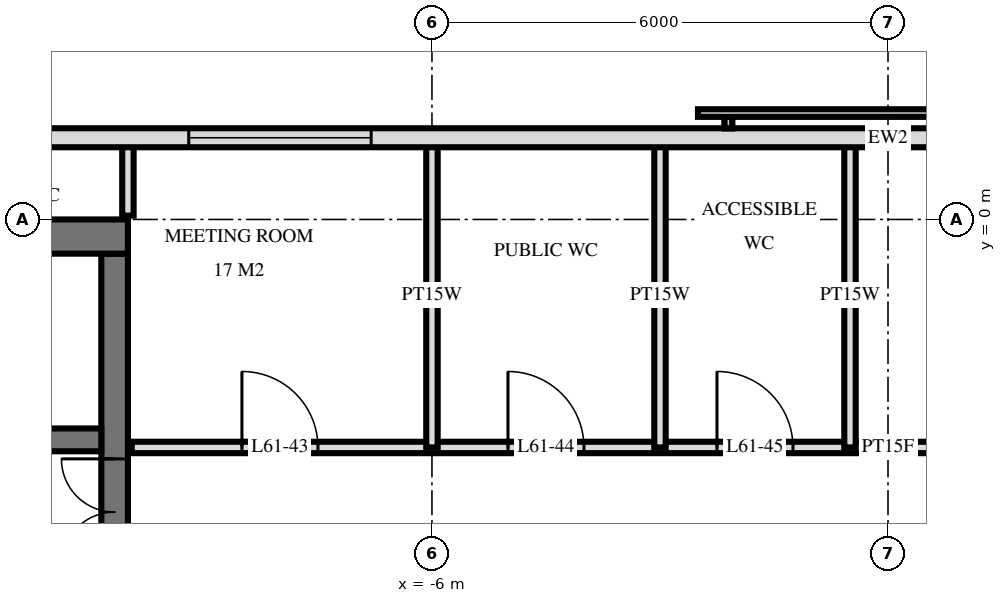
"""IFC4 building model, lengths in metres.
Left out: names, types, materials, properties, quantities, classifications, styles, units other than length and angle.
Written with IfcOpenShell. Run it as: python <this file> out.ifc"""

import sys

from ifc_helpers import new_model, si_unit, direction, frame, frame_2d, origin, place, context, subcontext, project, spatial, rectangle, extrude, element, fill, save


model = new_model("IFC4")
c1 = context("Model", 3, precision=1e-05, world=origin(), true_north=direction((0.0, 1.0)))
c2 = subcontext(c1, "Body", "Model", "MODEL_VIEW")
j1 = project(units=[si_unit("LENGTHUNIT", "METRE"), si_unit("PLANEANGLEUNIT", "RADIAN")], contexts=[c1])
p1 = place(None, origin())
s1 = spatial("IfcSite", under=j1, at=p1, CompositionType="ELEMENT")
p2 = place(p1, origin())
s2 = spatial("IfcBuilding", under=s1, at=p2, CompositionType="ELEMENT")
p3 = place(p2, frame((0.0, 0.0, 232.6)))
s3 = spatial("IfcBuildingStorey", under=s2, at=p3, CompositionType="ELEMENT", Elevation=232.6)
p4 = place(p3, frame((-24.5, -0.225, 0.0), z_axis=(0.0, 0.0, 1.0), x_axis=(1.0, 0.0, 0.0)))
e1 = element("IfcWall", 1, at=p4, inside=s3, PredefinedType="SHEAR", context=c2, shape_type="SweptSolid", body=[
    extrude(rectangle(XDim=14.5, YDim=0.45, at=frame_2d((7.25, 0.0))), origin(), (0.0, 0.0, 1.0), 3.5),
])
p5 = place(p3, frame((-10.175, -14.55, 0.0), z_axis=(0.0, 0.0, 1.0), x_axis=(0.0, 1.0, 0.0)))
e2 = element("IfcWall", 2, at=p5, inside=s3, PredefinedType="SHEAR", context=c2, shape_type="SweptSolid", body=[
    extrude(rectangle(XDim=14.1, YDim=0.35, at=frame_2d((7.05, 0.0))), origin(), (0.0, 0.0, 1.0), 3.5),
])
p6 = place(p5, frame((8.4, 0.0, 0.0)))
e3 = element("IfcOpeningElement", 3, at=p6, cuts=e2, PredefinedType="OPENING", context=c2, shape_type="SweptSolid", body=[
    extrude(rectangle(XDim=1.4, YDim=2.4, at=frame_2d((0.7, 1.2))), frame((0.0, 0.185, 0.0), z_axis=(0.0, -1.0, 0.0), x_axis=(1.0, 0.0, 0.0)), (0.0, 0.0, 1.0), 0.37),
])
p7 = place(p5, frame((10.0, 0.0, 0.0)))
e4 = element("IfcOpeningElement", 4, at=p7, cuts=e2, PredefinedType="OPENING", context=c2, shape_type="SweptSolid", body=[
    extrude(rectangle(XDim=1.4, YDim=2.4, at=frame_2d((0.7, 1.2))), frame((0.0, 0.185, 0.0), z_axis=(0.0, -1.0, 0.0), x_axis=(1.0, 0.0, 0.0)), (0.0, 0.0, 1.0), 0.37),
])
p8 = place(p5, frame((4.0, 0.0, 0.0)))
e5 = element("IfcOpeningElement", 5, at=p8, cuts=e2, PredefinedType="OPENING", context=c2, shape_type="SweptSolid", body=[
    extrude(rectangle(XDim=1.2, YDim=2.1, at=frame_2d((0.6, 1.05))), frame((0.0, 0.185, 0.0), z_axis=(0.0, -1.0, 0.0), x_axis=(1.0, 0.0, 0.0)), (0.0, 0.0, 1.0), 0.37),
])
p9 = place(p3, frame((-24.05, -2.9, 0.0), z_axis=(0.0, 0.0, 1.0), x_axis=(1.0, 0.0, 0.0)))
e6 = element("IfcWall", 6, at=p9, inside=s3, PredefinedType="SHEAR", context=c2, shape_type="SweptSolid", body=[
    extrude(rectangle(XDim=13.7, YDim=0.3, at=frame_2d((6.85, 0.0))), origin(), (0.0, 0.0, 1.0), 3.5),
])
p10 = place(p9, frame((0.55, 0.0, 0.0)))
e7 = element("IfcOpeningElement", 7, at=p10, cuts=e6, PredefinedType="OPENING", context=c2, shape_type="SweptSolid", body=[
    extrude(rectangle(XDim=1.1, YDim=2.1, at=frame_2d((0.55, 1.05))), frame((0.0, 0.16, 0.0), z_axis=(0.0, -1.0, 0.0), x_axis=(1.0, 0.0, 0.0)), (0.0, 0.0, 1.0), 0.32),
])
p11 = place(p9, frame((5.9, 0.0, 0.0)))
e8 = element("IfcOpeningElement", 8, at=p11, cuts=e6, PredefinedType="OPENING", context=c2, shape_type="SweptSolid", body=[
    extrude(rectangle(XDim=0.9, YDim=2.1, at=frame_2d((0.45, 1.05))), frame((0.0, 0.16, 0.0), z_axis=(0.0, -1.0, 0.0), x_axis=(1.0, 0.0, 0.0)), (0.0, 0.0, 1.0), 0.32),
])
p12 = place(p9, frame((11.85, 0.0, 0.0)))
e9 = element("IfcOpeningElement", 9, at=p12, cuts=e6, PredefinedType="OPENING", context=c2, shape_type="SweptSolid", body=[
    extrude(rectangle(XDim=1.0, YDim=2.1, at=frame_2d((0.5, 1.05))), frame((0.0, 0.16, 0.0), z_axis=(0.0, -1.0, 0.0), x_axis=(1.0, 0.0, 0.0)), (0.0, 0.0, 1.0), 0.32),
])
p13 = place(p9, frame((8.85, 0.0, 0.0)))
e10 = element("IfcOpeningElement", 10, at=p13, cuts=e6, PredefinedType="OPENING", context=c2, shape_type="SweptSolid", body=[
    extrude(rectangle(XDim=1.0, YDim=2.1, at=frame_2d((0.5, 1.05))), frame((0.0, 0.16, 0.0), z_axis=(0.0, -1.0, 0.0), x_axis=(1.0, 0.0, 0.0)), (0.0, 0.0, 1.0), 0.32),
])
p14 = place(p9, frame((3.0, 0.0, 0.0)))
e11 = element("IfcOpeningElement", 11, at=p14, cuts=e6, PredefinedType="OPENING", context=c2, shape_type="SweptSolid", body=[
    extrude(rectangle(XDim=1.0, YDim=2.1, at=frame_2d((0.5, 1.05))), frame((0.0, 0.16, 0.0), z_axis=(0.0, -1.0, 0.0), x_axis=(1.0, 0.0, 0.0)), (0.0, 0.0, 1.0), 0.32),
])
p15 = place(p3, frame((22.475, 1.075, 0.0), z_axis=(0.0, 0.0, 1.0), x_axis=(-1.0, 0.0, 0.0)))
e12 = element("IfcWall", 12, at=p15, inside=s3, PredefinedType="SOLIDWALL", context=c2, shape_type="SweptSolid", body=[
    extrude(rectangle(XDim=44.951, YDim=0.25, at=frame_2d((22.475, 0.0))), origin(), (0.0, 0.0, 1.0), 3.22),
])
p16 = place(p15, frame((15.275, 0.0, 0.9)))
e13 = element("IfcOpeningElement", 13, at=p16, cuts=e12, PredefinedType="OPENING", context=c2, shape_type="SweptSolid", body=[
    extrude(rectangle(XDim=2.4, YDim=1.5, at=frame_2d((1.2, 0.75))), frame((0.0, 0.135, 0.0), z_axis=(0.0, -1.0, 0.0), x_axis=(1.0, 0.0, 0.0)), (0.0, 0.0, 1.0), 0.27),
])
p17 = place(p15, frame((18.275, 0.0, 0.9)))
e14 = element("IfcOpeningElement", 14, at=p17, cuts=e12, PredefinedType="OPENING", context=c2, shape_type="SweptSolid", body=[
    extrude(rectangle(XDim=2.4, YDim=1.5, at=frame_2d((1.2, 0.75))), frame((0.0, 0.135, 0.0), z_axis=(0.0, -1.0, 0.0), x_axis=(1.0, 0.0, 0.0)), (0.0, 0.0, 1.0), 0.27),
])
p18 = place(p15, frame((29.275, 0.0, 0.9)))
e15 = element("IfcOpeningElement", 15, at=p18, cuts=e12, PredefinedType="OPENING", context=c2, shape_type="SweptSolid", body=[
    extrude(rectangle(XDim=2.4, YDim=1.5, at=frame_2d((1.2, 0.75))), frame((0.0, 0.135, 0.0), z_axis=(0.0, -1.0, 0.0), x_axis=(1.0, 0.0, 0.0)), (0.0, 0.0, 1.0), 0.27),
])
for number, where, z_axis, x_axis in (
    (16, (-0.5, -3.0, 0.0), (0.0, 0.0, 1.0), (0.0, 1.0, 0.0)),
    (17, (-3.0, -3.0, 0.0), (0.0, 0.0, 1.0), (0.0, 1.0, 0.0)),
    (18, (-6.0, -3.0, 0.0), (0.0, 0.0, 1.0), (0.0, 1.0, 0.0)),
):
    element("IfcWall", number, at=place(p3, frame(where, z_axis=z_axis, x_axis=x_axis)), inside=s3, PredefinedType="PLUMBINGWALL", context=c2, shape_type="SweptSolid", body=[
        extrude(rectangle(XDim=4.02, YDim=0.15, at=frame_2d((2.01, 0.0))), origin(), (0.0, 0.0, 1.0), 3.22),
    ])
p19 = place(p3, frame((-10.0, 0.05, 0.0), z_axis=(0.0, 0.0, 1.0), x_axis=(0.0, 1.0, 0.0)))
e19 = element("IfcWall", 19, at=p19, inside=s3, PredefinedType="PARTITIONING", context=c2, shape_type="SweptSolid", body=[
    extrude(rectangle(XDim=0.97, YDim=0.15, at=frame_2d((0.485, 0.0))), origin(), (0.0, 0.0, 1.0), 3.22),
])
p20 = place(p3, frame((-9.95, -3.0, 0.0), z_axis=(0.0, 0.0, 1.0), x_axis=(1.0, 0.0, 0.0)))
e20 = element("IfcWall", 20, at=p20, inside=s3, PredefinedType="PARTITIONING", context=c2, shape_type="SweptSolid", body=[
    extrude(rectangle(XDim=19.9, YDim=0.15, at=frame_2d((9.95, 0.0))), origin(), (0.0, 0.0, 1.0), 3.22),
])
p21 = place(p20, frame((1.45, 0.0, 0.0)))
e21 = element("IfcOpeningElement", 21, at=p21, cuts=e20, PredefinedType="OPENING", context=c2, shape_type="SweptSolid", body=[
    extrude(rectangle(XDim=1.0, YDim=2.1, at=frame_2d((0.5, 1.05))), frame((0.0, 0.085, 0.0), z_axis=(0.0, -1.0, 0.0), x_axis=(1.0, 0.0, 0.0)), (0.0, 0.0, 1.0), 0.17),
])
p22 = place(p20, frame((4.95, 0.0, 0.0)))
e22 = element("IfcOpeningElement", 22, at=p22, cuts=e20, PredefinedType="OPENING", context=c2, shape_type="SweptSolid", body=[
    extrude(rectangle(XDim=1.0, YDim=2.1, at=frame_2d((0.5, 1.05))), frame((0.0, 0.085, 0.0), z_axis=(0.0, -1.0, 0.0), x_axis=(1.0, 0.0, 0.0)), (0.0, 0.0, 1.0), 0.17),
])
p23 = place(p20, frame((7.7, 0.0, 0.0)))
e23 = element("IfcOpeningElement", 23, at=p23, cuts=e20, PredefinedType="OPENING", context=c2, shape_type="SweptSolid", body=[
    extrude(rectangle(XDim=1.0, YDim=2.1, at=frame_2d((0.5, 1.05))), frame((0.0, 0.085, 0.0), z_axis=(0.0, -1.0, 0.0), x_axis=(1.0, 0.0, 0.0)), (0.0, 0.0, 1.0), 0.17),
])
p24 = place(p20, frame((14.2, 0.0, 0.0)))
e24 = element("IfcOpeningElement", 24, at=p24, cuts=e20, PredefinedType="OPENING", context=c2, shape_type="SweptSolid", body=[
    extrude(rectangle(XDim=1.0, YDim=2.1, at=frame_2d((0.5, 1.05))), frame((0.0, 0.085, 0.0), z_axis=(0.0, -1.0, 0.0), x_axis=(1.0, 0.0, 0.0)), (0.0, 0.0, 1.0), 0.17),
])
p25 = place(p18, origin())
e25 = element("IfcWindow", 25, at=p25, inside=s3, PartitioningType="SINGLE_PANEL", PredefinedType="WINDOW", context=c2, shape_type="SweptSolid", body=[
    extrude(rectangle(XDim=2.4, YDim=1.5, at=frame_2d((1.2, 0.75))), frame((0.0, 0.03, 0.0), z_axis=(0.0, -1.0, 0.0), x_axis=(1.0, 0.0, 0.0)), (0.0, 0.0, 1.0), 0.06),
])
fill(e15, e25)
p26 = place(p7, origin())
e26 = element("IfcDoor", 26, at=p26, inside=s3, OperationType="DOUBLE_DOOR_SINGLE_SWING", PredefinedType="DOOR", context=c2, shape_type="SweptSolid", body=[
    extrude(rectangle(XDim=1.4, YDim=2.4, at=frame_2d((0.7, 1.2))), frame((0.0, 0.025, 0.0), z_axis=(0.0, -1.0, 0.0), x_axis=(1.0, 0.0, 0.0)), (0.0, 0.0, 1.0), 0.05),
])
fill(e4, e26)
p27 = place(p21, origin())
e27 = element("IfcDoor", 27, at=p27, inside=s3, OperationType="SINGLE_SWING_RIGHT", PredefinedType="DOOR", context=c2, shape_type="SweptSolid", body=[
    extrude(rectangle(XDim=1.0, YDim=2.1, at=frame_2d((0.5, 1.05))), frame((0.0, 0.025, 0.0), z_axis=(0.0, -1.0, 0.0), x_axis=(1.0, 0.0, 0.0)), (0.0, 0.0, 1.0), 0.05),
])
fill(e21, e27)
p28 = place(p22, origin())
e28 = element("IfcDoor", 28, at=p28, inside=s3, OperationType="SINGLE_SWING_RIGHT", PredefinedType="DOOR", context=c2, shape_type="SweptSolid", body=[
    extrude(rectangle(XDim=1.0, YDim=2.1, at=frame_2d((0.5, 1.05))), frame((0.0, 0.025, 0.0), z_axis=(0.0, -1.0, 0.0), x_axis=(1.0, 0.0, 0.0)), (0.0, 0.0, 1.0), 0.05),
])
fill(e22, e28)
p29 = place(p23, origin())
e29 = element("IfcDoor", 29, at=p29, inside=s3, OperationType="SINGLE_SWING_RIGHT", PredefinedType="DOOR", context=c2, shape_type="SweptSolid", body=[
    extrude(rectangle(XDim=1.0, YDim=2.1, at=frame_2d((0.5, 1.05))), frame((0.0, 0.025, 0.0), z_axis=(0.0, -1.0, 0.0), x_axis=(1.0, 0.0, 0.0)), (0.0, 0.0, 1.0), 0.05),
])
fill(e23, e29)
save(model, sys.argv[1])
